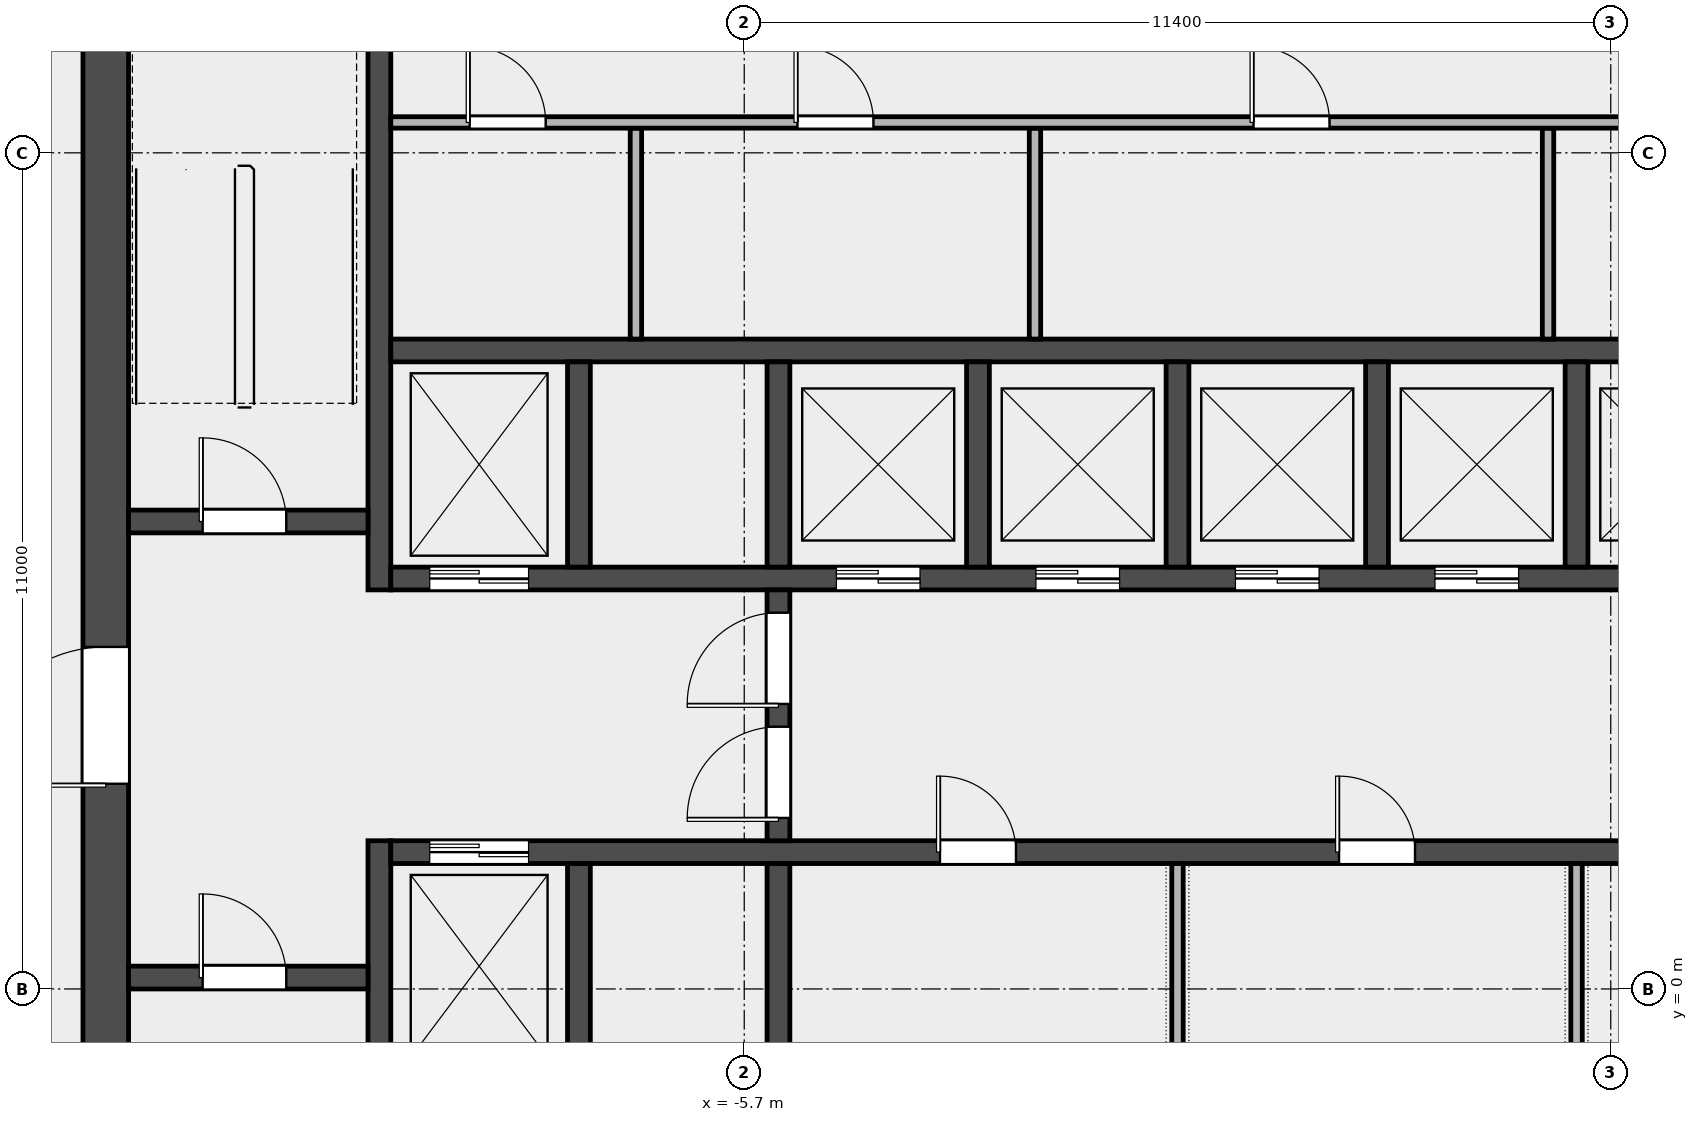
"""IFC4 building model, lengths in metres.
Left out: names, types, materials, properties, quantities, classifications, styles, units other than length and angle.
Written with IfcOpenShell. Run it as: python <this file> out.ifc"""

import sys

from ifc_helpers import new_model, si_unit, direction, frame, frame_2d, origin, place, context, subcontext, project, spatial, rectangle, extrude, element, fill, save


model = new_model("IFC4")
c1 = context("Model", 3, precision=1e-05, world=origin(), true_north=direction((0.0, 1.0)))
c2 = subcontext(c1, "Body", "Model", "MODEL_VIEW")
j1 = project(units=[si_unit("LENGTHUNIT", "METRE"), si_unit("PLANEANGLEUNIT", "RADIAN")], contexts=[c1])
p1 = place(None, origin())
s1 = spatial("IfcSite", under=j1, at=p1, CompositionType="ELEMENT")
p2 = place(p1, origin())
s2 = spatial("IfcBuilding", under=s1, at=p2, CompositionType="ELEMENT")
p3 = place(p2, frame((0.0, 0.0, 215.0)))
s3 = spatial("IfcBuildingStorey", under=s2, at=p3, CompositionType="ELEMENT", Elevation=215.0)
p4 = place(p3, frame((-14.1, -6.6, 0.0), z_axis=(0.0, 0.0, 1.0), x_axis=(0.0, 1.0, 0.0)))
e1 = element("IfcWall", 1, at=p4, inside=s3, PredefinedType="SHEAR", context=c2, shape_type="SweptSolid", body=[
    extrude(rectangle(XDim=19.5, YDim=0.6, at=frame_2d((9.75, 0.0))), origin(), (0.0, 0.0, 1.0), 3.7),
])
p5 = place(p4, frame((9.3, 0.0, 0.0)))
e2 = element("IfcOpeningElement", 2, at=p5, cuts=e1, PredefinedType="OPENING", context=c2, shape_type="SweptSolid", body=[
    extrude(rectangle(XDim=1.8, YDim=2.1, at=frame_2d((0.9, 1.05))), frame((0.0, 0.312, 0.0), z_axis=(0.0, -1.0, 0.0), x_axis=(1.0, 0.0, 0.0)), (0.0, 0.0, 1.0), 0.624),
])
p6 = place(p3, frame((-10.5, -6.6, 0.0), z_axis=(0.0, 0.0, 1.0), x_axis=(0.0, 1.0, 0.0)))
e3 = element("IfcWall", 3, at=p6, inside=s3, PredefinedType="SHEAR", context=c2, shape_type="SweptSolid", body=[
    extrude(rectangle(XDim=8.55, YDim=0.3, at=frame_2d((4.275, 0.0))), origin(), (0.0, 0.0, 1.0), 3.7),
])
p7 = place(p3, frame((-10.5, 5.25, 0.0), z_axis=(0.0, 0.0, 1.0), x_axis=(0.0, 1.0, 0.0)))
e4 = element("IfcWall", 4, at=p7, inside=s3, PredefinedType="SHEAR", context=c2, shape_type="SweptSolid", body=[
    extrude(rectangle(XDim=7.65, YDim=0.3, at=frame_2d((3.825, 0.0))), origin(), (0.0, 0.0, 1.0), 3.7),
])
p8 = place(p3, frame((-13.8, 0.15, 0.0), z_axis=(0.0, 0.0, 1.0), x_axis=(1.0, 0.0, 0.0)))
e5 = element("IfcWall", 5, at=p8, inside=s3, PredefinedType="SOLIDWALL", context=c2, shape_type="SweptSolid", body=[
    extrude(rectangle(XDim=3.15, YDim=0.3, at=frame_2d((1.575, 0.0))), origin(), (0.0, 0.0, 1.0), 3.7),
])
p9 = place(p8, frame((0.975, 0.0, 0.0)))
e6 = element("IfcOpeningElement", 6, at=p9, cuts=e5, PredefinedType="OPENING", context=c2, shape_type="SweptSolid", body=[
    extrude(rectangle(XDim=1.1, YDim=2.1, at=frame_2d((0.55, 1.05))), frame((0.0, 0.162, 0.0), z_axis=(0.0, -1.0, 0.0), x_axis=(1.0, 0.0, 0.0)), (0.0, 0.0, 1.0), 0.324),
])
p10 = place(p3, frame((-13.8, 6.15, 0.0), z_axis=(0.0, 0.0, 1.0), x_axis=(1.0, 0.0, 0.0)))
e7 = element("IfcWall", 7, at=p10, inside=s3, PredefinedType="SOLIDWALL", context=c2, shape_type="SweptSolid", body=[
    extrude(rectangle(XDim=3.15, YDim=0.3, at=frame_2d((1.575, 0.0))), origin(), (0.0, 0.0, 1.0), 3.7),
])
p11 = place(p10, frame((0.975, 0.0, 0.0)))
e8 = element("IfcOpeningElement", 8, at=p11, cuts=e7, PredefinedType="OPENING", context=c2, shape_type="SweptSolid", body=[
    extrude(rectangle(XDim=1.1, YDim=2.1, at=frame_2d((0.55, 1.05))), frame((0.0, 0.162, 0.0), z_axis=(0.0, -1.0, 0.0), x_axis=(1.0, 0.0, 0.0)), (0.0, 0.0, 1.0), 0.324),
])
p12 = place(p3, frame((-10.35, 1.8, 0.0), z_axis=(0.0, 0.0, 1.0), x_axis=(1.0, 0.0, 0.0)))
e9 = element("IfcWall", 9, at=p12, inside=s3, PredefinedType="SOLIDWALL", context=c2, shape_type="SweptSolid", body=[
    extrude(rectangle(XDim=20.7, YDim=0.3, at=frame_2d((10.35, 0.0))), origin(), (0.0, 0.0, 1.0), 3.7),
])
p13 = place(p12, frame((0.512, 0.0, 0.0)))
e10 = element("IfcOpeningElement", 10, at=p13, cuts=e9, PredefinedType="OPENING", context=c2, shape_type="SweptSolid", body=[
    extrude(rectangle(XDim=1.3, YDim=2.1, at=frame_2d((0.65, 1.05))), frame((0.0, 0.162, 0.0), z_axis=(0.0, -1.0, 0.0), x_axis=(1.0, 0.0, 0.0)), (0.0, 0.0, 1.0), 0.324),
])
p14 = place(p12, frame((7.225, 0.0, 0.0)))
e11 = element("IfcOpeningElement", 11, at=p14, cuts=e9, PredefinedType="OPENING", context=c2, shape_type="SweptSolid", body=[
    extrude(rectangle(XDim=1.0, YDim=2.1, at=frame_2d((0.5, 1.05))), frame((0.0, 0.162, 0.0), z_axis=(0.0, -1.0, 0.0), x_axis=(1.0, 0.0, 0.0)), (0.0, 0.0, 1.0), 0.324),
])
p15 = place(p12, frame((12.475, 0.0, 0.0)))
e12 = element("IfcOpeningElement", 12, at=p15, cuts=e9, PredefinedType="OPENING", context=c2, shape_type="SweptSolid", body=[
    extrude(rectangle(XDim=1.0, YDim=2.1, at=frame_2d((0.5, 1.05))), frame((0.0, 0.162, 0.0), z_axis=(0.0, -1.0, 0.0), x_axis=(1.0, 0.0, 0.0)), (0.0, 0.0, 1.0), 0.324),
])
p16 = place(p12, frame((16.413, 0.0, 0.0)))
e13 = element("IfcOpeningElement", 13, at=p16, cuts=e9, PredefinedType="OPENING", context=c2, shape_type="SweptSolid", body=[
    extrude(rectangle(XDim=1.0, YDim=2.1, at=frame_2d((0.5, 1.05))), frame((0.0, 0.162, 0.0), z_axis=(0.0, -1.0, 0.0), x_axis=(1.0, 0.0, 0.0)), (0.0, 0.0, 1.0), 0.324),
])
p17 = place(p12, frame((19.038, 0.0, 0.0)))
e14 = element("IfcOpeningElement", 14, at=p17, cuts=e9, PredefinedType="OPENING", context=c2, shape_type="SweptSolid", body=[
    extrude(rectangle(XDim=1.0, YDim=2.1, at=frame_2d((0.5, 1.05))), frame((0.0, 0.162, 0.0), z_axis=(0.0, -1.0, 0.0), x_axis=(1.0, 0.0, 0.0)), (0.0, 0.0, 1.0), 0.324),
])
p18 = place(p3, frame((-10.35, 5.4, 0.0), z_axis=(0.0, 0.0, 1.0), x_axis=(1.0, 0.0, 0.0)))
e15 = element("IfcWall", 15, at=p18, inside=s3, PredefinedType="SOLIDWALL", context=c2, shape_type="SweptSolid", body=[
    extrude(rectangle(XDim=20.7, YDim=0.3, at=frame_2d((10.35, 0.0))), origin(), (0.0, 0.0, 1.0), 3.7),
])
p19 = place(p18, frame((0.512, 0.0, 0.0)))
e16 = element("IfcOpeningElement", 16, at=p19, cuts=e15, PredefinedType="OPENING", context=c2, shape_type="SweptSolid", body=[
    extrude(rectangle(XDim=1.3, YDim=2.1, at=frame_2d((0.65, 1.05))), frame((0.0, 0.162, 0.0), z_axis=(0.0, -1.0, 0.0), x_axis=(1.0, 0.0, 0.0)), (0.0, 0.0, 1.0), 0.324),
])
p20 = place(p18, frame((5.863, 0.0, 0.0)))
e17 = element("IfcOpeningElement", 17, at=p20, cuts=e15, PredefinedType="OPENING", context=c2, shape_type="SweptSolid", body=[
    extrude(rectangle(XDim=1.1, YDim=2.1, at=frame_2d((0.55, 1.05))), frame((0.0, 0.162, 0.0), z_axis=(0.0, -1.0, 0.0), x_axis=(1.0, 0.0, 0.0)), (0.0, 0.0, 1.0), 0.324),
])
p21 = place(p18, frame((8.488, 0.0, 0.0)))
e18 = element("IfcOpeningElement", 18, at=p21, cuts=e15, PredefinedType="OPENING", context=c2, shape_type="SweptSolid", body=[
    extrude(rectangle(XDim=1.1, YDim=2.1, at=frame_2d((0.55, 1.05))), frame((0.0, 0.162, 0.0), z_axis=(0.0, -1.0, 0.0), x_axis=(1.0, 0.0, 0.0)), (0.0, 0.0, 1.0), 0.324),
])
p22 = place(p18, frame((11.113, 0.0, 0.0)))
e19 = element("IfcOpeningElement", 19, at=p22, cuts=e15, PredefinedType="OPENING", context=c2, shape_type="SweptSolid", body=[
    extrude(rectangle(XDim=1.1, YDim=2.1, at=frame_2d((0.55, 1.05))), frame((0.0, 0.162, 0.0), z_axis=(0.0, -1.0, 0.0), x_axis=(1.0, 0.0, 0.0)), (0.0, 0.0, 1.0), 0.324),
])
p23 = place(p18, frame((13.738, 0.0, 0.0)))
e20 = element("IfcOpeningElement", 20, at=p23, cuts=e15, PredefinedType="OPENING", context=c2, shape_type="SweptSolid", body=[
    extrude(rectangle(XDim=1.1, YDim=2.1, at=frame_2d((0.55, 1.05))), frame((0.0, 0.162, 0.0), z_axis=(0.0, -1.0, 0.0), x_axis=(1.0, 0.0, 0.0)), (0.0, 0.0, 1.0), 0.324),
])
p24 = place(p18, frame((16.363, 0.0, 0.0)))
e21 = element("IfcOpeningElement", 21, at=p24, cuts=e15, PredefinedType="OPENING", context=c2, shape_type="SweptSolid", body=[
    extrude(rectangle(XDim=1.1, YDim=2.1, at=frame_2d((0.55, 1.05))), frame((0.0, 0.162, 0.0), z_axis=(0.0, -1.0, 0.0), x_axis=(1.0, 0.0, 0.0)), (0.0, 0.0, 1.0), 0.324),
])
p25 = place(p18, frame((18.988, 0.0, 0.0)))
e22 = element("IfcOpeningElement", 22, at=p25, cuts=e15, PredefinedType="OPENING", context=c2, shape_type="SweptSolid", body=[
    extrude(rectangle(XDim=1.1, YDim=2.1, at=frame_2d((0.55, 1.05))), frame((0.0, 0.162, 0.0), z_axis=(0.0, -1.0, 0.0), x_axis=(1.0, 0.0, 0.0)), (0.0, 0.0, 1.0), 0.324),
])
p26 = place(p3, frame((-10.35, 8.4, 0.0), z_axis=(0.0, 0.0, 1.0), x_axis=(1.0, 0.0, 0.0)))
e23 = element("IfcWall", 23, at=p26, inside=s3, PredefinedType="SOLIDWALL", context=c2, shape_type="SweptSolid", body=[
    extrude(rectangle(XDim=20.7, YDim=0.3, at=frame_2d((10.35, 0.0))), origin(), (0.0, 0.0, 1.0), 3.7),
])
for number, where, z_axis, x_axis in (
    (24, (-7.875, -1.05, 0.0), (0.0, 0.0, 1.0), (0.0, 1.0, 0.0)),
    (25, (-5.25, -1.05, 0.0), (0.0, 0.0, 1.0), (0.0, 1.0, 0.0)),
    (26, (-7.875, 5.55, 0.0), (0.0, 0.0, 1.0), (0.0, 1.0, 0.0)),
    (27, (-5.25, 5.55, 0.0), (0.0, 0.0, 1.0), (0.0, 1.0, 0.0)),
    (28, (-2.625, 5.55, 0.0), (0.0, 0.0, 1.0), (0.0, 1.0, 0.0)),
    (29, (0.0, 5.55, 0.0), (0.0, 0.0, 1.0), (0.0, 1.0, 0.0)),
    (30, (2.625, 5.55, 0.0), (0.0, 0.0, 1.0), (0.0, 1.0, 0.0)),
    (31, (5.25, 5.55, 0.0), (0.0, 0.0, 1.0), (0.0, 1.0, 0.0)),
):
    element("IfcWall", number, at=place(p3, frame(where, z_axis=z_axis, x_axis=x_axis)), inside=s3, PredefinedType="SOLIDWALL", context=c2, shape_type="SweptSolid", body=[
        extrude(rectangle(XDim=2.7, YDim=0.3, at=frame_2d((1.35, 0.0))), origin(), (0.0, 0.0, 1.0), 3.7),
    ])
p27 = place(p3, frame((-5.25, 1.95, 0.0), z_axis=(0.0, 0.0, 1.0), x_axis=(0.0, 1.0, 0.0)))
e32 = element("IfcWall", 32, at=p27, inside=s3, PredefinedType="SOLIDWALL", context=c2, shape_type="SweptSolid", body=[
    extrude(rectangle(XDim=3.3, YDim=0.3, at=frame_2d((1.65, 0.0))), origin(), (0.0, 0.0, 1.0), 3.7),
])
p28 = place(p27, frame((0.3, 0.0, 0.0)))
e33 = element("IfcOpeningElement", 33, at=p28, cuts=e32, PredefinedType="OPENING", context=c2, shape_type="SweptSolid", body=[
    extrude(rectangle(XDim=1.2, YDim=2.1, at=frame_2d((0.6, 1.05))), frame((0.0, 0.162, 0.0), z_axis=(0.0, -1.0, 0.0), x_axis=(1.0, 0.0, 0.0)), (0.0, 0.0, 1.0), 0.324),
])
p29 = place(p27, frame((1.8, 0.0, 0.0)))
e34 = element("IfcOpeningElement", 34, at=p29, cuts=e32, PredefinedType="OPENING", context=c2, shape_type="SweptSolid", body=[
    extrude(rectangle(XDim=1.2, YDim=2.1, at=frame_2d((0.6, 1.05))), frame((0.0, 0.162, 0.0), z_axis=(0.0, -1.0, 0.0), x_axis=(1.0, 0.0, 0.0)), (0.0, 0.0, 1.0), 0.324),
])
for number, where, z_axis, x_axis in (
    (35, (-7.125, 8.55, 0.0), (0.0, 0.0, 1.0), (0.0, 1.0, 0.0)),
    (36, (-1.875, 8.55, 0.0), (0.0, 0.0, 1.0), (0.0, 1.0, 0.0)),
    (37, (4.875, 8.55, 0.0), (0.0, 0.0, 1.0), (0.0, 1.0, 0.0)),
):
    element("IfcWall", number, at=place(p3, frame(where, z_axis=z_axis, x_axis=x_axis)), inside=s3, PredefinedType="PARTITIONING", context=c2, shape_type="SweptSolid", body=[
        extrude(rectangle(XDim=2.775, YDim=0.15, at=frame_2d((1.387, 0.0))), origin(), (0.0, 0.0, 1.0), 3.7),
    ])
p30 = place(p3, frame((-10.35, 11.4, 0.0), z_axis=(0.0, 0.0, 1.0), x_axis=(1.0, 0.0, 0.0)))
e38 = element("IfcWall", 38, at=p30, inside=s3, PredefinedType="PARTITIONING", context=c2, shape_type="SweptSolid", body=[
    extrude(rectangle(XDim=20.7, YDim=0.15, at=frame_2d((10.35, 0.0))), origin(), (0.0, 0.0, 1.0), 3.7),
])
p31 = place(p30, frame((1.038, 0.0, 0.0)))
e39 = element("IfcOpeningElement", 39, at=p31, cuts=e38, PredefinedType="OPENING", context=c2, shape_type="SweptSolid", body=[
    extrude(rectangle(XDim=1.0, YDim=2.1, at=frame_2d((0.5, 1.05))), frame((0.0, 0.087, 0.0), z_axis=(0.0, -1.0, 0.0), x_axis=(1.0, 0.0, 0.0)), (0.0, 0.0, 1.0), 0.174),
])
p32 = place(p30, frame((5.35, 0.0, 0.0)))
e40 = element("IfcOpeningElement", 40, at=p32, cuts=e38, PredefinedType="OPENING", context=c2, shape_type="SweptSolid", body=[
    extrude(rectangle(XDim=1.0, YDim=2.1, at=frame_2d((0.5, 1.05))), frame((0.0, 0.087, 0.0), z_axis=(0.0, -1.0, 0.0), x_axis=(1.0, 0.0, 0.0)), (0.0, 0.0, 1.0), 0.174),
])
p33 = place(p30, frame((11.35, 0.0, 0.0)))
e41 = element("IfcOpeningElement", 41, at=p33, cuts=e38, PredefinedType="OPENING", context=c2, shape_type="SweptSolid", body=[
    extrude(rectangle(XDim=1.0, YDim=2.1, at=frame_2d((0.5, 1.05))), frame((0.0, 0.087, 0.0), z_axis=(0.0, -1.0, 0.0), x_axis=(1.0, 0.0, 0.0)), (0.0, 0.0, 1.0), 0.174),
])
p34 = place(p30, frame((17.538, 0.0, 0.0)))
e42 = element("IfcOpeningElement", 42, at=p34, cuts=e38, PredefinedType="OPENING", context=c2, shape_type="SweptSolid", body=[
    extrude(rectangle(XDim=1.0, YDim=2.1, at=frame_2d((0.5, 1.05))), frame((0.0, 0.087, 0.0), z_axis=(0.0, -1.0, 0.0), x_axis=(1.0, 0.0, 0.0)), (0.0, 0.0, 1.0), 0.174),
])
for number, where, z_axis, x_axis in (
    (43, (0.0, -1.05, 0.0), (0.0, 0.0, 1.0), (0.0, 1.0, 0.0)),
    (44, (5.25, -1.05, 0.0), (0.0, 0.0, 1.0), (0.0, 1.0, 0.0)),
):
    element("IfcWall", number, at=place(p3, frame(where, z_axis=z_axis, x_axis=x_axis)), inside=s3, PredefinedType="PARTITIONING", context=c2, shape_type="SweptSolid", body=[
        extrude(rectangle(XDim=2.7, YDim=0.15, at=frame_2d((1.35, 0.0))), origin(), (0.0, 0.0, 1.0), 3.7),
    ])
p35 = place(p9, origin())
e45 = element("IfcDoor", 45, at=p35, inside=s3, OperationType="SINGLE_SWING_LEFT", PredefinedType="DOOR", context=c2, shape_type="SweptSolid", body=[
    extrude(rectangle(XDim=1.1, YDim=2.1, at=frame_2d((0.55, 1.05))), frame((0.0, 0.025, 0.0), z_axis=(0.0, -1.0, 0.0), x_axis=(1.0, 0.0, 0.0)), (0.0, 0.0, 1.0), 0.05),
])
fill(e6, e45)
p36 = place(p11, origin())
e46 = element("IfcDoor", 46, at=p36, inside=s3, OperationType="SINGLE_SWING_LEFT", PredefinedType="DOOR", context=c2, shape_type="SweptSolid", body=[
    extrude(rectangle(XDim=1.1, YDim=2.1, at=frame_2d((0.55, 1.05))), frame((0.0, 0.025, 0.0), z_axis=(0.0, -1.0, 0.0), x_axis=(1.0, 0.0, 0.0)), (0.0, 0.0, 1.0), 0.05),
])
fill(e8, e46)
p37 = place(p5, origin())
e47 = element("IfcDoor", 47, at=p37, inside=s3, OperationType="DOUBLE_DOOR_SINGLE_SWING", PredefinedType="DOOR", context=c2, shape_type="SweptSolid", body=[
    extrude(rectangle(XDim=1.8, YDim=2.1, at=frame_2d((0.9, 1.05))), frame((0.0, 0.025, 0.0), z_axis=(0.0, -1.0, 0.0), x_axis=(1.0, 0.0, 0.0)), (0.0, 0.0, 1.0), 0.05),
])
fill(e2, e47)
p38 = place(p28, origin())
e48 = element("IfcDoor", 48, at=p38, inside=s3, OperationType="SINGLE_SWING_LEFT", PredefinedType="DOOR", context=c2, shape_type="SweptSolid", body=[
    extrude(rectangle(XDim=1.2, YDim=2.1, at=frame_2d((0.6, 1.05))), frame((0.0, 0.025, 0.0), z_axis=(0.0, -1.0, 0.0), x_axis=(1.0, 0.0, 0.0)), (0.0, 0.0, 1.0), 0.05),
])
fill(e33, e48)
p39 = place(p29, origin())
e49 = element("IfcDoor", 49, at=p39, inside=s3, OperationType="SINGLE_SWING_RIGHT", PredefinedType="DOOR", context=c2, shape_type="SweptSolid", body=[
    extrude(rectangle(XDim=1.2, YDim=2.1, at=frame_2d((0.6, 1.05))), frame((0.0, 0.025, 0.0), z_axis=(0.0, -1.0, 0.0), x_axis=(1.0, 0.0, 0.0)), (0.0, 0.0, 1.0), 0.05),
])
fill(e34, e49)
p40 = place(p13, origin())
e50 = element("IfcDoor", 50, at=p40, inside=s3, OperationType="DOUBLE_DOOR_SLIDING", PredefinedType="DOOR", context=c2, shape_type="SweptSolid", body=[
    extrude(rectangle(XDim=1.3, YDim=2.1, at=frame_2d((0.65, 1.05))), frame((0.0, 0.025, 0.0), z_axis=(0.0, -1.0, 0.0), x_axis=(1.0, 0.0, 0.0)), (0.0, 0.0, 1.0), 0.05),
])
fill(e10, e50)
p41 = place(p19, origin())
e51 = element("IfcDoor", 51, at=p41, inside=s3, OperationType="DOUBLE_DOOR_SLIDING", PredefinedType="DOOR", context=c2, shape_type="SweptSolid", body=[
    extrude(rectangle(XDim=1.3, YDim=2.1, at=frame_2d((0.65, 1.05))), frame((0.0, 0.025, 0.0), z_axis=(0.0, -1.0, 0.0), x_axis=(1.0, 0.0, 0.0)), (0.0, 0.0, 1.0), 0.05),
])
fill(e16, e51)
p42 = place(p20, origin())
e52 = element("IfcDoor", 52, at=p42, inside=s3, OperationType="DOUBLE_DOOR_SLIDING", PredefinedType="DOOR", context=c2, shape_type="SweptSolid", body=[
    extrude(rectangle(XDim=1.1, YDim=2.1, at=frame_2d((0.55, 1.05))), frame((0.0, 0.025, 0.0), z_axis=(0.0, -1.0, 0.0), x_axis=(1.0, 0.0, 0.0)), (0.0, 0.0, 1.0), 0.05),
])
fill(e17, e52)
p43 = place(p21, origin())
e53 = element("IfcDoor", 53, at=p43, inside=s3, OperationType="DOUBLE_DOOR_SLIDING", PredefinedType="DOOR", context=c2, shape_type="SweptSolid", body=[
    extrude(rectangle(XDim=1.1, YDim=2.1, at=frame_2d((0.55, 1.05))), frame((0.0, 0.025, 0.0), z_axis=(0.0, -1.0, 0.0), x_axis=(1.0, 0.0, 0.0)), (0.0, 0.0, 1.0), 0.05),
])
fill(e18, e53)
p44 = place(p22, origin())
e54 = element("IfcDoor", 54, at=p44, inside=s3, OperationType="DOUBLE_DOOR_SLIDING", PredefinedType="DOOR", context=c2, shape_type="SweptSolid", body=[
    extrude(rectangle(XDim=1.1, YDim=2.1, at=frame_2d((0.55, 1.05))), frame((0.0, 0.025, 0.0), z_axis=(0.0, -1.0, 0.0), x_axis=(1.0, 0.0, 0.0)), (0.0, 0.0, 1.0), 0.05),
])
fill(e19, e54)
p45 = place(p23, origin())
e55 = element("IfcDoor", 55, at=p45, inside=s3, OperationType="DOUBLE_DOOR_SLIDING", PredefinedType="DOOR", context=c2, shape_type="SweptSolid", body=[
    extrude(rectangle(XDim=1.1, YDim=2.1, at=frame_2d((0.55, 1.05))), frame((0.0, 0.025, 0.0), z_axis=(0.0, -1.0, 0.0), x_axis=(1.0, 0.0, 0.0)), (0.0, 0.0, 1.0), 0.05),
])
fill(e20, e55)
p46 = place(p31, origin())
e56 = element("IfcDoor", 56, at=p46, inside=s3, OperationType="SINGLE_SWING_LEFT", PredefinedType="DOOR", context=c2, shape_type="SweptSolid", body=[
    extrude(rectangle(XDim=1.0, YDim=2.1, at=frame_2d((0.5, 1.05))), frame((0.0, 0.025, 0.0), z_axis=(0.0, -1.0, 0.0), x_axis=(1.0, 0.0, 0.0)), (0.0, 0.0, 1.0), 0.05),
])
fill(e39, e56)
p47 = place(p32, origin())
e57 = element("IfcDoor", 57, at=p47, inside=s3, OperationType="SINGLE_SWING_LEFT", PredefinedType="DOOR", context=c2, shape_type="SweptSolid", body=[
    extrude(rectangle(XDim=1.0, YDim=2.1, at=frame_2d((0.5, 1.05))), frame((0.0, 0.025, 0.0), z_axis=(0.0, -1.0, 0.0), x_axis=(1.0, 0.0, 0.0)), (0.0, 0.0, 1.0), 0.05),
])
fill(e40, e57)
p48 = place(p33, origin())
e58 = element("IfcDoor", 58, at=p48, inside=s3, OperationType="SINGLE_SWING_LEFT", PredefinedType="DOOR", context=c2, shape_type="SweptSolid", body=[
    extrude(rectangle(XDim=1.0, YDim=2.1, at=frame_2d((0.5, 1.05))), frame((0.0, 0.025, 0.0), z_axis=(0.0, -1.0, 0.0), x_axis=(1.0, 0.0, 0.0)), (0.0, 0.0, 1.0), 0.05),
])
fill(e41, e58)
p49 = place(p14, origin())
e59 = element("IfcDoor", 59, at=p49, inside=s3, OperationType="SINGLE_SWING_LEFT", PredefinedType="DOOR", context=c2, shape_type="SweptSolid", body=[
    extrude(rectangle(XDim=1.0, YDim=2.1, at=frame_2d((0.5, 1.05))), frame((0.0, 0.025, 0.0), z_axis=(0.0, -1.0, 0.0), x_axis=(1.0, 0.0, 0.0)), (0.0, 0.0, 1.0), 0.05),
])
fill(e11, e59)
p50 = place(p15, origin())
e60 = element("IfcDoor", 60, at=p50, inside=s3, OperationType="SINGLE_SWING_LEFT", PredefinedType="DOOR", context=c2, shape_type="SweptSolid", body=[
    extrude(rectangle(XDim=1.0, YDim=2.1, at=frame_2d((0.5, 1.05))), frame((0.0, 0.025, 0.0), z_axis=(0.0, -1.0, 0.0), x_axis=(1.0, 0.0, 0.0)), (0.0, 0.0, 1.0), 0.05),
])
fill(e12, e60)
save(model, sys.argv[1])
